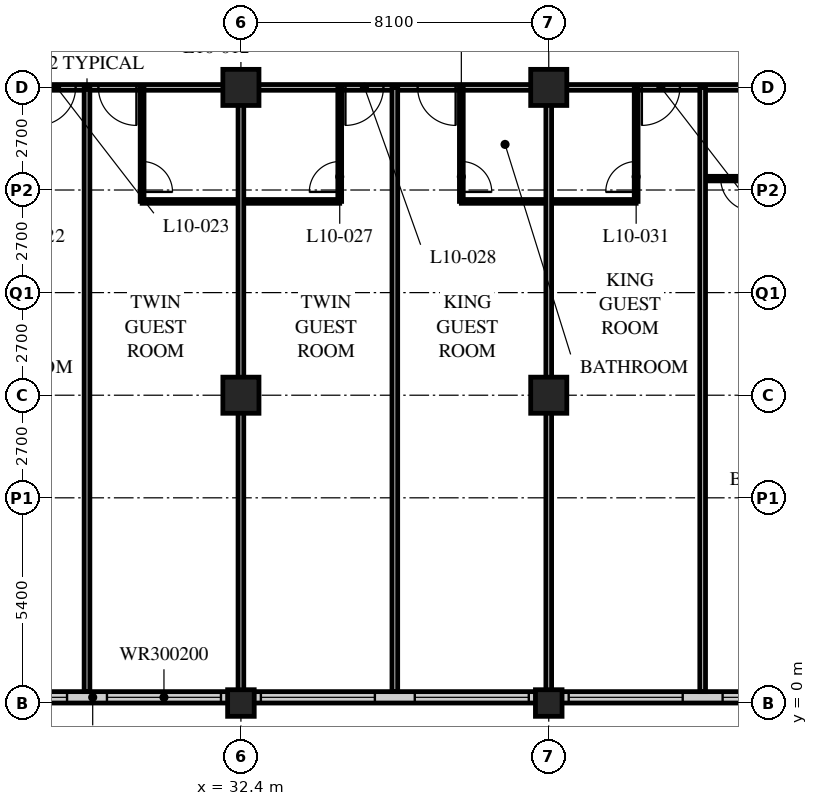
"""IFC4 building model, lengths in metres.
Left out: names, types, materials, properties, quantities, classifications, styles, units other than length and angle.
Written with IfcOpenShell. Run it as: python <this file> out.ifc"""

import sys

from ifc_helpers import new_model, si_unit, direction, frame, frame_2d, origin, origin_2d, place, context, subcontext, project, spatial, rectangle, hollow_rectangle, extrude, element, fill, save


model = new_model("IFC4")
c1 = context("Model", 3, precision=1e-05, world=origin(), true_north=direction((0.0, 1.0)))
c2 = subcontext(c1, "Body", "Model", "MODEL_VIEW")
j1 = project(units=[si_unit("LENGTHUNIT", "METRE"), si_unit("PLANEANGLEUNIT", "RADIAN")], contexts=[c1])
p1 = place(None, origin())
s1 = spatial("IfcSite", under=j1, at=p1, CompositionType="ELEMENT")
p2 = place(p1, origin())
s2 = spatial("IfcBuilding", under=s1, at=p2, CompositionType="ELEMENT")
p3 = place(p2, frame((0.0, 0.0, 46.6)))
s3 = spatial("IfcBuildingStorey", under=s2, at=p3, CompositionType="ELEMENT", Elevation=46.6)
p4 = place(p3, frame((32.4, 0.0, 0.0), z_axis=(0.0, 0.0, 1.0), x_axis=(1.0, 0.0, 0.0)))
e1 = element("IfcColumn", 1, at=p4, inside=s3, PredefinedType="COLUMN", context=c2, shape_type="SweptSolid", body=[
    extrude(hollow_rectangle(XDim=0.7, YDim=0.7, WallThickness=0.06, at=origin_2d()), origin(), (0.0, 0.0, 1.0), 3.4),
])
for number, where, z_axis, x_axis in (
    (2, (32.4, 8.1, 0.0), (0.0, 0.0, 1.0), (1.0, 0.0, 0.0)),
    (3, (32.4, 16.2, 0.0), (0.0, 0.0, 1.0), (1.0, 0.0, 0.0)),
):
    element("IfcColumn", number, at=place(p3, frame(where, z_axis=z_axis, x_axis=x_axis)), inside=s3, PredefinedType="COLUMN", context=c2, shape_type="SweptSolid", body=[
        extrude(hollow_rectangle(XDim=0.95, YDim=0.95, WallThickness=0.095, at=origin_2d()), origin(), (0.0, 0.0, 1.0), 3.4),
    ])
p5 = place(p3, frame((40.5, 0.0, 0.0), z_axis=(0.0, 0.0, 1.0), x_axis=(1.0, 0.0, 0.0)))
e4 = element("IfcColumn", 4, at=p5, inside=s3, PredefinedType="COLUMN", context=c2, shape_type="SweptSolid", body=[
    extrude(hollow_rectangle(XDim=0.7, YDim=0.7, WallThickness=0.06, at=origin_2d()), origin(), (0.0, 0.0, 1.0), 3.4),
])
for number, where, z_axis, x_axis in (
    (5, (40.5, 8.1, 0.0), (0.0, 0.0, 1.0), (1.0, 0.0, 0.0)),
    (6, (40.5, 16.2, 0.0), (0.0, 0.0, 1.0), (1.0, 0.0, 0.0)),
):
    element("IfcColumn", number, at=place(p3, frame(where, z_axis=z_axis, x_axis=x_axis)), inside=s3, PredefinedType="COLUMN", context=c2, shape_type="SweptSolid", body=[
        extrude(hollow_rectangle(XDim=0.95, YDim=0.95, WallThickness=0.095, at=origin_2d()), origin(), (0.0, 0.0, 1.0), 3.4),
    ])
p6 = place(p3, frame((8.4, 0.15, 0.0), z_axis=(0.0, 0.0, 1.0), x_axis=(1.0, 0.0, 0.0)))
e7 = element("IfcWall", 7, at=p6, inside=s3, PredefinedType="SOLIDWALL", context=c2, shape_type="SweptSolid", body=[
    extrude(rectangle(XDim=40.2, YDim=0.3, at=frame_2d((20.1, 0.0))), origin(), (0.0, 0.0, 1.0), 3.19),
])
p7 = place(p6, frame((0.225, 0.0, 0.9)))
e8 = element("IfcOpeningElement", 8, at=p7, cuts=e7, PredefinedType="OPENING", context=c2, shape_type="SweptSolid", body=[
    extrude(rectangle(XDim=3.0, YDim=2.0, at=frame_2d((1.5, 1.0))), frame((0.0, 0.16, 0.0), z_axis=(0.0, -1.0, 0.0), x_axis=(1.0, 0.0, 0.0)), (0.0, 0.0, 1.0), 0.32),
])
p8 = place(p6, frame((4.275, 0.0, 0.9)))
e9 = element("IfcOpeningElement", 9, at=p8, cuts=e7, PredefinedType="OPENING", context=c2, shape_type="SweptSolid", body=[
    extrude(rectangle(XDim=3.0, YDim=2.0, at=frame_2d((1.5, 1.0))), frame((0.0, 0.16, 0.0), z_axis=(0.0, -1.0, 0.0), x_axis=(1.0, 0.0, 0.0)), (0.0, 0.0, 1.0), 0.32),
])
p9 = place(p6, frame((8.325, 0.0, 0.9)))
e10 = element("IfcOpeningElement", 10, at=p9, cuts=e7, PredefinedType="OPENING", context=c2, shape_type="SweptSolid", body=[
    extrude(rectangle(XDim=3.0, YDim=2.0, at=frame_2d((1.5, 1.0))), frame((0.0, 0.16, 0.0), z_axis=(0.0, -1.0, 0.0), x_axis=(1.0, 0.0, 0.0)), (0.0, 0.0, 1.0), 0.32),
])
p10 = place(p6, frame((12.375, 0.0, 0.9)))
e11 = element("IfcOpeningElement", 11, at=p10, cuts=e7, PredefinedType="OPENING", context=c2, shape_type="SweptSolid", body=[
    extrude(rectangle(XDim=3.0, YDim=2.0, at=frame_2d((1.5, 1.0))), frame((0.0, 0.16, 0.0), z_axis=(0.0, -1.0, 0.0), x_axis=(1.0, 0.0, 0.0)), (0.0, 0.0, 1.0), 0.32),
])
p11 = place(p6, frame((16.425, 0.0, 0.9)))
e12 = element("IfcOpeningElement", 12, at=p11, cuts=e7, PredefinedType="OPENING", context=c2, shape_type="SweptSolid", body=[
    extrude(rectangle(XDim=3.0, YDim=2.0, at=frame_2d((1.5, 1.0))), frame((0.0, 0.16, 0.0), z_axis=(0.0, -1.0, 0.0), x_axis=(1.0, 0.0, 0.0)), (0.0, 0.0, 1.0), 0.32),
])
p12 = place(p6, frame((20.475, 0.0, 0.9)))
e13 = element("IfcOpeningElement", 13, at=p12, cuts=e7, PredefinedType="OPENING", context=c2, shape_type="SweptSolid", body=[
    extrude(rectangle(XDim=3.0, YDim=2.0, at=frame_2d((1.5, 1.0))), frame((0.0, 0.16, 0.0), z_axis=(0.0, -1.0, 0.0), x_axis=(1.0, 0.0, 0.0)), (0.0, 0.0, 1.0), 0.32),
])
p13 = place(p6, frame((24.525, 0.0, 0.9)))
e14 = element("IfcOpeningElement", 14, at=p13, cuts=e7, PredefinedType="OPENING", context=c2, shape_type="SweptSolid", body=[
    extrude(rectangle(XDim=3.0, YDim=2.0, at=frame_2d((1.5, 1.0))), frame((0.0, 0.16, 0.0), z_axis=(0.0, -1.0, 0.0), x_axis=(1.0, 0.0, 0.0)), (0.0, 0.0, 1.0), 0.32),
])
p14 = place(p6, frame((28.575, 0.0, 0.9)))
e15 = element("IfcOpeningElement", 15, at=p14, cuts=e7, PredefinedType="OPENING", context=c2, shape_type="SweptSolid", body=[
    extrude(rectangle(XDim=3.0, YDim=2.0, at=frame_2d((1.5, 1.0))), frame((0.0, 0.16, 0.0), z_axis=(0.0, -1.0, 0.0), x_axis=(1.0, 0.0, 0.0)), (0.0, 0.0, 1.0), 0.32),
])
p15 = place(p6, frame((32.625, 0.0, 0.9)))
e16 = element("IfcOpeningElement", 16, at=p15, cuts=e7, PredefinedType="OPENING", context=c2, shape_type="SweptSolid", body=[
    extrude(rectangle(XDim=3.0, YDim=2.0, at=frame_2d((1.5, 1.0))), frame((0.0, 0.16, 0.0), z_axis=(0.0, -1.0, 0.0), x_axis=(1.0, 0.0, 0.0)), (0.0, 0.0, 1.0), 0.32),
])
p16 = place(p6, frame((36.675, 0.0, 0.9)))
e17 = element("IfcOpeningElement", 17, at=p16, cuts=e7, PredefinedType="OPENING", context=c2, shape_type="SweptSolid", body=[
    extrude(rectangle(XDim=3.0, YDim=2.0, at=frame_2d((1.5, 1.0))), frame((0.0, 0.16, 0.0), z_axis=(0.0, -1.0, 0.0), x_axis=(1.0, 0.0, 0.0)), (0.0, 0.0, 1.0), 0.32),
])
p17 = place(p3, frame((8.1, 16.2, 0.0), z_axis=(0.0, 0.0, 1.0), x_axis=(1.0, 0.0, 0.0)))
e18 = element("IfcWall", 18, at=p17, inside=s3, PredefinedType="PARTITIONING", context=c2, shape_type="SweptSolid", body=[
    extrude(rectangle(XDim=40.5, YDim=0.15, at=frame_2d((20.25, 0.0))), origin(), (0.0, 0.0, 1.0), 2.578),
])
p18 = place(p17, frame((4.35, 0.0, 0.0)))
e19 = element("IfcOpeningElement", 19, at=p18, cuts=e18, PredefinedType="OPENING", context=c2, shape_type="SweptSolid", body=[
    extrude(rectangle(XDim=1.0, YDim=2.1, at=frame_2d((0.5, 1.05))), frame((0.0, 0.085, 0.0), z_axis=(0.0, -1.0, 0.0), x_axis=(1.0, 0.0, 0.0)), (0.0, 0.0, 1.0), 0.17),
])
p19 = place(p17, frame((10.85, 0.0, 0.0)))
e20 = element("IfcOpeningElement", 20, at=p19, cuts=e18, PredefinedType="OPENING", context=c2, shape_type="SweptSolid", body=[
    extrude(rectangle(XDim=1.0, YDim=2.1, at=frame_2d((0.5, 1.05))), frame((0.0, 0.085, 0.0), z_axis=(0.0, -1.0, 0.0), x_axis=(1.0, 0.0, 0.0)), (0.0, 0.0, 1.0), 0.17),
])
p20 = place(p17, frame((12.75, 0.0, 0.0)))
e21 = element("IfcOpeningElement", 21, at=p20, cuts=e18, PredefinedType="OPENING", context=c2, shape_type="SweptSolid", body=[
    extrude(rectangle(XDim=1.0, YDim=2.1, at=frame_2d((0.5, 1.05))), frame((0.0, 0.085, 0.0), z_axis=(0.0, -1.0, 0.0), x_axis=(1.0, 0.0, 0.0)), (0.0, 0.0, 1.0), 0.17),
])
p21 = place(p17, frame((18.95, 0.0, 0.0)))
e22 = element("IfcOpeningElement", 22, at=p21, cuts=e18, PredefinedType="OPENING", context=c2, shape_type="SweptSolid", body=[
    extrude(rectangle(XDim=1.0, YDim=2.1, at=frame_2d((0.5, 1.05))), frame((0.0, 0.085, 0.0), z_axis=(0.0, -1.0, 0.0), x_axis=(1.0, 0.0, 0.0)), (0.0, 0.0, 1.0), 0.17),
])
p22 = place(p17, frame((20.55, 0.0, 0.0)))
e23 = element("IfcOpeningElement", 23, at=p22, cuts=e18, PredefinedType="OPENING", context=c2, shape_type="SweptSolid", body=[
    extrude(rectangle(XDim=1.0, YDim=2.1, at=frame_2d((0.5, 1.05))), frame((0.0, 0.085, 0.0), z_axis=(0.0, -1.0, 0.0), x_axis=(1.0, 0.0, 0.0)), (0.0, 0.0, 1.0), 0.17),
])
p23 = place(p17, frame((27.05, 0.0, 0.0)))
e24 = element("IfcOpeningElement", 24, at=p23, cuts=e18, PredefinedType="OPENING", context=c2, shape_type="SweptSolid", body=[
    extrude(rectangle(XDim=1.0, YDim=2.1, at=frame_2d((0.5, 1.05))), frame((0.0, 0.085, 0.0), z_axis=(0.0, -1.0, 0.0), x_axis=(1.0, 0.0, 0.0)), (0.0, 0.0, 1.0), 0.17),
])
p24 = place(p17, frame((28.95, 0.0, 0.0)))
e25 = element("IfcOpeningElement", 25, at=p24, cuts=e18, PredefinedType="OPENING", context=c2, shape_type="SweptSolid", body=[
    extrude(rectangle(XDim=1.0, YDim=2.1, at=frame_2d((0.5, 1.05))), frame((0.0, 0.085, 0.0), z_axis=(0.0, -1.0, 0.0), x_axis=(1.0, 0.0, 0.0)), (0.0, 0.0, 1.0), 0.17),
])
p25 = place(p17, frame((34.85, 0.0, 0.0)))
e26 = element("IfcOpeningElement", 26, at=p25, cuts=e18, PredefinedType="OPENING", context=c2, shape_type="SweptSolid", body=[
    extrude(rectangle(XDim=1.0, YDim=2.1, at=frame_2d((0.5, 1.05))), frame((0.0, 0.085, 0.0), z_axis=(0.0, -1.0, 0.0), x_axis=(1.0, 0.0, 0.0)), (0.0, 0.0, 1.0), 0.17),
])
p26 = place(p17, frame((1.525, 0.0, 0.0)))
e27 = element("IfcOpeningElement", 27, at=p26, cuts=e18, PredefinedType="OPENING", context=c2, shape_type="SweptSolid", body=[
    extrude(rectangle(XDim=1.0, YDim=2.1, at=frame_2d((0.5, 1.05))), frame((0.0, 0.085, 0.0), z_axis=(0.0, -1.0, 0.0), x_axis=(1.0, 0.0, 0.0)), (0.0, 0.0, 1.0), 0.17),
])
p27 = place(p17, frame((37.975, 0.0, 0.0)))
e28 = element("IfcOpeningElement", 28, at=p27, cuts=e18, PredefinedType="OPENING", context=c2, shape_type="SweptSolid", body=[
    extrude(rectangle(XDim=1.0, YDim=2.1, at=frame_2d((0.5, 1.05))), frame((0.0, 0.085, 0.0), z_axis=(0.0, -1.0, 0.0), x_axis=(1.0, 0.0, 0.0)), (0.0, 0.0, 1.0), 0.17),
])
p28 = place(p3, frame((28.35, 16.2, 0.0), z_axis=(0.0, 0.0, 1.0), x_axis=(0.0, -1.0, 0.0)))
e29 = element("IfcWall", 29, at=p28, inside=s3, PredefinedType="PARTITIONING", context=c2, shape_type="SweptSolid", body=[
    extrude(rectangle(XDim=15.9, YDim=0.15, at=frame_2d((7.95, 0.0))), origin(), (0.0, 0.0, 1.0), 3.19),
])
p29 = place(p3, frame((29.8, 13.2, 0.0), z_axis=(0.0, 0.0, 1.0), x_axis=(1.0, 0.0, 0.0)))
e30 = element("IfcWall", 30, at=p29, inside=s3, PredefinedType="PARTITIONING", context=c2, shape_type="SweptSolid", body=[
    extrude(rectangle(XDim=5.2, YDim=0.1, at=frame_2d((2.6, 0.0))), origin(), (0.0, 0.0, 1.0), 3.19),
])
p30 = place(p3, frame((29.8, 16.2, 0.0), z_axis=(0.0, 0.0, 1.0), x_axis=(0.0, -1.0, 0.0)))
e31 = element("IfcWall", 31, at=p30, inside=s3, PredefinedType="PARTITIONING", context=c2, shape_type="SweptSolid", body=[
    extrude(rectangle(XDim=3.0, YDim=0.1, at=frame_2d((1.5, 0.0))), origin(), (0.0, 0.0, 1.0), 3.19),
])
p31 = place(p30, frame((1.95, 0.0, 0.0)))
e32 = element("IfcOpeningElement", 32, at=p31, cuts=e31, PredefinedType="OPENING", context=c2, shape_type="SweptSolid", body=[
    extrude(rectangle(XDim=0.8, YDim=2.1, at=frame_2d((0.4, 1.05))), frame((0.0, 0.06, 0.0), z_axis=(0.0, -1.0, 0.0), x_axis=(1.0, 0.0, 0.0)), (0.0, 0.0, 1.0), 0.12),
])
p32 = place(p3, frame((32.4, 16.2, 0.0), z_axis=(0.0, 0.0, 1.0), x_axis=(0.0, -1.0, 0.0)))
e33 = element("IfcWall", 33, at=p32, inside=s3, PredefinedType="PARTITIONING", context=c2, shape_type="SweptSolid", body=[
    extrude(rectangle(XDim=15.9, YDim=0.15, at=frame_2d((7.95, 0.0))), origin(), (0.0, 0.0, 1.0), 2.578),
])
p33 = place(p3, frame((35.0, 16.2, 0.0), z_axis=(0.0, 0.0, 1.0), x_axis=(0.0, -1.0, 0.0)))
e34 = element("IfcWall", 34, at=p33, inside=s3, PredefinedType="PARTITIONING", context=c2, shape_type="SweptSolid", body=[
    extrude(rectangle(XDim=3.0, YDim=0.1, at=frame_2d((1.5, 0.0))), origin(), (0.0, 0.0, 1.0), 3.19),
])
p34 = place(p33, frame((1.95, 0.0, 0.0)))
e35 = element("IfcOpeningElement", 35, at=p34, cuts=e34, PredefinedType="OPENING", context=c2, shape_type="SweptSolid", body=[
    extrude(rectangle(XDim=0.8, YDim=2.1, at=frame_2d((0.4, 1.05))), frame((0.0, 0.06, 0.0), z_axis=(0.0, -1.0, 0.0), x_axis=(1.0, 0.0, 0.0)), (0.0, 0.0, 1.0), 0.12),
])
p35 = place(p3, frame((36.45, 16.2, 0.0), z_axis=(0.0, 0.0, 1.0), x_axis=(0.0, -1.0, 0.0)))
e36 = element("IfcWall", 36, at=p35, inside=s3, PredefinedType="PARTITIONING", context=c2, shape_type="SweptSolid", body=[
    extrude(rectangle(XDim=15.9, YDim=0.15, at=frame_2d((7.95, 0.0))), origin(), (0.0, 0.0, 1.0), 3.19),
])
p36 = place(p3, frame((38.2, 13.2, 0.0), z_axis=(0.0, 0.0, 1.0), x_axis=(1.0, 0.0, 0.0)))
e37 = element("IfcWall", 37, at=p36, inside=s3, PredefinedType="PARTITIONING", context=c2, shape_type="SweptSolid", body=[
    extrude(rectangle(XDim=4.6, YDim=0.1, at=frame_2d((2.3, 0.0))), origin(), (0.0, 0.0, 1.0), 3.19),
])
p37 = place(p3, frame((38.2, 16.2, 0.0), z_axis=(0.0, 0.0, 1.0), x_axis=(0.0, -1.0, 0.0)))
e38 = element("IfcWall", 38, at=p37, inside=s3, PredefinedType="PARTITIONING", context=c2, shape_type="SweptSolid", body=[
    extrude(rectangle(XDim=3.0, YDim=0.1, at=frame_2d((1.5, 0.0))), origin(), (0.0, 0.0, 1.0), 3.19),
])
p38 = place(p37, frame((1.95, 0.0, 0.0)))
e39 = element("IfcOpeningElement", 39, at=p38, cuts=e38, PredefinedType="OPENING", context=c2, shape_type="SweptSolid", body=[
    extrude(rectangle(XDim=0.8, YDim=2.1, at=frame_2d((0.4, 1.05))), frame((0.0, 0.06, 0.0), z_axis=(0.0, -1.0, 0.0), x_axis=(1.0, 0.0, 0.0)), (0.0, 0.0, 1.0), 0.12),
])
p39 = place(p3, frame((40.5, 16.2, 0.0), z_axis=(0.0, 0.0, 1.0), x_axis=(0.0, -1.0, 0.0)))
e40 = element("IfcWall", 40, at=p39, inside=s3, PredefinedType="PARTITIONING", context=c2, shape_type="SweptSolid", body=[
    extrude(rectangle(XDim=15.9, YDim=0.15, at=frame_2d((7.95, 0.0))), origin(), (0.0, 0.0, 1.0), 2.578),
])
p40 = place(p3, frame((42.8, 16.2, 0.0), z_axis=(0.0, 0.0, 1.0), x_axis=(0.0, -1.0, 0.0)))
e41 = element("IfcWall", 41, at=p40, inside=s3, PredefinedType="PARTITIONING", context=c2, shape_type="SweptSolid", body=[
    extrude(rectangle(XDim=3.0, YDim=0.1, at=frame_2d((1.5, 0.0))), origin(), (0.0, 0.0, 1.0), 3.19),
])
p41 = place(p40, frame((1.95, 0.0, 0.0)))
e42 = element("IfcOpeningElement", 42, at=p41, cuts=e41, PredefinedType="OPENING", context=c2, shape_type="SweptSolid", body=[
    extrude(rectangle(XDim=0.8, YDim=2.1, at=frame_2d((0.4, 1.05))), frame((0.0, 0.06, 0.0), z_axis=(0.0, -1.0, 0.0), x_axis=(1.0, 0.0, 0.0)), (0.0, 0.0, 1.0), 0.12),
])
p42 = place(p3, frame((44.55, 13.8, 0.0), z_axis=(0.0, 0.0, 1.0), x_axis=(1.0, 0.0, 0.0)))
e43 = element("IfcWall", 43, at=p42, inside=s3, PredefinedType="PARTITIONING", context=c2, shape_type="SweptSolid", body=[
    extrude(rectangle(XDim=8.05, YDim=0.12, at=frame_2d((4.025, 0.0))), origin(), (0.0, 0.0, 1.0), 3.19),
])
p43 = place(p42, frame((0.475, 0.0, 0.0)))
e44 = element("IfcOpeningElement", 44, at=p43, cuts=e43, PredefinedType="OPENING", context=c2, shape_type="SweptSolid", body=[
    extrude(rectangle(XDim=0.85, YDim=2.1, at=frame_2d((0.425, 1.05))), frame((0.0, 0.07, 0.0), z_axis=(0.0, -1.0, 0.0), x_axis=(1.0, 0.0, 0.0)), (0.0, 0.0, 1.0), 0.14),
])
p44 = place(p42, frame((4.325, 0.0, 0.0)))
e45 = element("IfcOpeningElement", 45, at=p44, cuts=e43, PredefinedType="OPENING", context=c2, shape_type="SweptSolid", body=[
    extrude(rectangle(XDim=0.85, YDim=2.1, at=frame_2d((0.425, 1.05))), frame((0.0, 0.07, 0.0), z_axis=(0.0, -1.0, 0.0), x_axis=(1.0, 0.0, 0.0)), (0.0, 0.0, 1.0), 0.14),
])
p45 = place(p3, frame((44.55, 16.2, 0.0), z_axis=(0.0, 0.0, 1.0), x_axis=(0.0, -1.0, 0.0)))
e46 = element("IfcWall", 46, at=p45, inside=s3, PredefinedType="PARTITIONING", context=c2, shape_type="SweptSolid", body=[
    extrude(rectangle(XDim=15.9, YDim=0.15, at=frame_2d((7.95, 0.0))), origin(), (0.0, 0.0, 1.0), 3.19),
])
p46 = place(p11, origin())
e47 = element("IfcWindow", 47, at=p46, inside=s3, PartitioningType="SINGLE_PANEL", PredefinedType="WINDOW", context=c2, shape_type="SweptSolid", body=[
    extrude(rectangle(XDim=3.0, YDim=2.0, at=frame_2d((1.5, 1.0))), frame((0.0, 0.03, 0.0), z_axis=(0.0, -1.0, 0.0), x_axis=(1.0, 0.0, 0.0)), (0.0, 0.0, 1.0), 0.06),
])
fill(e12, e47)
p47 = place(p12, origin())
e48 = element("IfcWindow", 48, at=p47, inside=s3, PartitioningType="SINGLE_PANEL", PredefinedType="WINDOW", context=c2, shape_type="SweptSolid", body=[
    extrude(rectangle(XDim=3.0, YDim=2.0, at=frame_2d((1.5, 1.0))), frame((0.0, 0.03, 0.0), z_axis=(0.0, -1.0, 0.0), x_axis=(1.0, 0.0, 0.0)), (0.0, 0.0, 1.0), 0.06),
])
fill(e13, e48)
p48 = place(p13, origin())
e49 = element("IfcWindow", 49, at=p48, inside=s3, PartitioningType="SINGLE_PANEL", PredefinedType="WINDOW", context=c2, shape_type="SweptSolid", body=[
    extrude(rectangle(XDim=3.0, YDim=2.0, at=frame_2d((1.5, 1.0))), frame((0.0, 0.03, 0.0), z_axis=(0.0, -1.0, 0.0), x_axis=(1.0, 0.0, 0.0)), (0.0, 0.0, 1.0), 0.06),
])
fill(e14, e49)
p49 = place(p14, origin())
e50 = element("IfcWindow", 50, at=p49, inside=s3, PartitioningType="SINGLE_PANEL", PredefinedType="WINDOW", context=c2, shape_type="SweptSolid", body=[
    extrude(rectangle(XDim=3.0, YDim=2.0, at=frame_2d((1.5, 1.0))), frame((0.0, 0.03, 0.0), z_axis=(0.0, -1.0, 0.0), x_axis=(1.0, 0.0, 0.0)), (0.0, 0.0, 1.0), 0.06),
])
fill(e15, e50)
p50 = place(p15, origin())
e51 = element("IfcWindow", 51, at=p50, inside=s3, PartitioningType="SINGLE_PANEL", PredefinedType="WINDOW", context=c2, shape_type="SweptSolid", body=[
    extrude(rectangle(XDim=3.0, YDim=2.0, at=frame_2d((1.5, 1.0))), frame((0.0, 0.03, 0.0), z_axis=(0.0, -1.0, 0.0), x_axis=(1.0, 0.0, 0.0)), (0.0, 0.0, 1.0), 0.06),
])
fill(e16, e51)
p51 = place(p16, origin())
e52 = element("IfcWindow", 52, at=p51, inside=s3, PartitioningType="SINGLE_PANEL", PredefinedType="WINDOW", context=c2, shape_type="SweptSolid", body=[
    extrude(rectangle(XDim=3.0, YDim=2.0, at=frame_2d((1.5, 1.0))), frame((0.0, 0.03, 0.0), z_axis=(0.0, -1.0, 0.0), x_axis=(1.0, 0.0, 0.0)), (0.0, 0.0, 1.0), 0.06),
])
fill(e17, e52)
p52 = place(p21, origin())
e53 = element("IfcDoor", 53, at=p52, inside=s3, OperationType="SINGLE_SWING_RIGHT", PredefinedType="DOOR", context=c2, shape_type="SweptSolid", body=[
    extrude(rectangle(XDim=1.0, YDim=2.1, at=frame_2d((0.5, 1.05))), frame((0.0, 0.025, 0.0), z_axis=(0.0, -1.0, 0.0), x_axis=(1.0, 0.0, 0.0)), (0.0, 0.0, 1.0), 0.05),
])
fill(e22, e53)
p53 = place(p31, origin())
e54 = element("IfcDoor", 54, at=p53, inside=s3, OperationType="SINGLE_SWING_RIGHT", PredefinedType="DOOR", context=c2, shape_type="SweptSolid", body=[
    extrude(rectangle(XDim=0.8, YDim=2.1, at=frame_2d((0.4, 1.05))), frame((0.0, 0.025, 0.0), z_axis=(0.0, -1.0, 0.0), x_axis=(1.0, 0.0, 0.0)), (0.0, 0.0, 1.0), 0.05),
])
fill(e32, e54)
p54 = place(p22, origin())
e55 = element("IfcDoor", 55, at=p54, inside=s3, OperationType="SINGLE_SWING_LEFT", PredefinedType="DOOR", context=c2, shape_type="SweptSolid", body=[
    extrude(rectangle(XDim=1.0, YDim=2.1, at=frame_2d((0.5, 1.05))), frame((0.0, 0.025, 0.0), z_axis=(0.0, -1.0, 0.0), x_axis=(1.0, 0.0, 0.0)), (0.0, 0.0, 1.0), 0.05),
])
fill(e23, e55)
p55 = place(p34, origin())
e56 = element("IfcDoor", 56, at=p55, inside=s3, OperationType="SINGLE_SWING_LEFT", PredefinedType="DOOR", context=c2, shape_type="SweptSolid", body=[
    extrude(rectangle(XDim=0.8, YDim=2.1, at=frame_2d((0.4, 1.05))), frame((0.0, 0.025, 0.0), z_axis=(0.0, -1.0, 0.0), x_axis=(1.0, 0.0, 0.0)), (0.0, 0.0, 1.0), 0.05),
])
fill(e35, e56)
p56 = place(p23, origin())
e57 = element("IfcDoor", 57, at=p56, inside=s3, OperationType="SINGLE_SWING_RIGHT", PredefinedType="DOOR", context=c2, shape_type="SweptSolid", body=[
    extrude(rectangle(XDim=1.0, YDim=2.1, at=frame_2d((0.5, 1.05))), frame((0.0, 0.025, 0.0), z_axis=(0.0, -1.0, 0.0), x_axis=(1.0, 0.0, 0.0)), (0.0, 0.0, 1.0), 0.05),
])
fill(e24, e57)
p57 = place(p38, origin())
e58 = element("IfcDoor", 58, at=p57, inside=s3, OperationType="SINGLE_SWING_RIGHT", PredefinedType="DOOR", context=c2, shape_type="SweptSolid", body=[
    extrude(rectangle(XDim=0.8, YDim=2.1, at=frame_2d((0.4, 1.05))), frame((0.0, 0.025, 0.0), z_axis=(0.0, -1.0, 0.0), x_axis=(1.0, 0.0, 0.0)), (0.0, 0.0, 1.0), 0.05),
])
fill(e39, e58)
p58 = place(p24, origin())
e59 = element("IfcDoor", 59, at=p58, inside=s3, OperationType="SINGLE_SWING_LEFT", PredefinedType="DOOR", context=c2, shape_type="SweptSolid", body=[
    extrude(rectangle(XDim=1.0, YDim=2.1, at=frame_2d((0.5, 1.05))), frame((0.0, 0.025, 0.0), z_axis=(0.0, -1.0, 0.0), x_axis=(1.0, 0.0, 0.0)), (0.0, 0.0, 1.0), 0.05),
])
fill(e25, e59)
p59 = place(p41, origin())
e60 = element("IfcDoor", 60, at=p59, inside=s3, OperationType="SINGLE_SWING_LEFT", PredefinedType="DOOR", context=c2, shape_type="SweptSolid", body=[
    extrude(rectangle(XDim=0.8, YDim=2.1, at=frame_2d((0.4, 1.05))), frame((0.0, 0.025, 0.0), z_axis=(0.0, -1.0, 0.0), x_axis=(1.0, 0.0, 0.0)), (0.0, 0.0, 1.0), 0.05),
])
fill(e42, e60)
p60 = place(p25, origin())
e61 = element("IfcDoor", 61, at=p60, inside=s3, OperationType="SINGLE_SWING_RIGHT", PredefinedType="DOOR", context=c2, shape_type="SweptSolid", body=[
    extrude(rectangle(XDim=1.0, YDim=2.1, at=frame_2d((0.5, 1.05))), frame((0.0, 0.025, 0.0), z_axis=(0.0, -1.0, 0.0), x_axis=(1.0, 0.0, 0.0)), (0.0, 0.0, 1.0), 0.05),
])
fill(e26, e61)
p61 = place(p43, origin())
e62 = element("IfcDoor", 62, at=p61, inside=s3, OperationType="SINGLE_SWING_LEFT", PredefinedType="DOOR", context=c2, shape_type="SweptSolid", body=[
    extrude(rectangle(XDim=0.85, YDim=2.1, at=frame_2d((0.425, 1.05))), frame((0.0, 0.025, 0.0), z_axis=(0.0, -1.0, 0.0), x_axis=(1.0, 0.0, 0.0)), (0.0, 0.0, 1.0), 0.05),
])
fill(e44, e62)
save(model, sys.argv[1])
